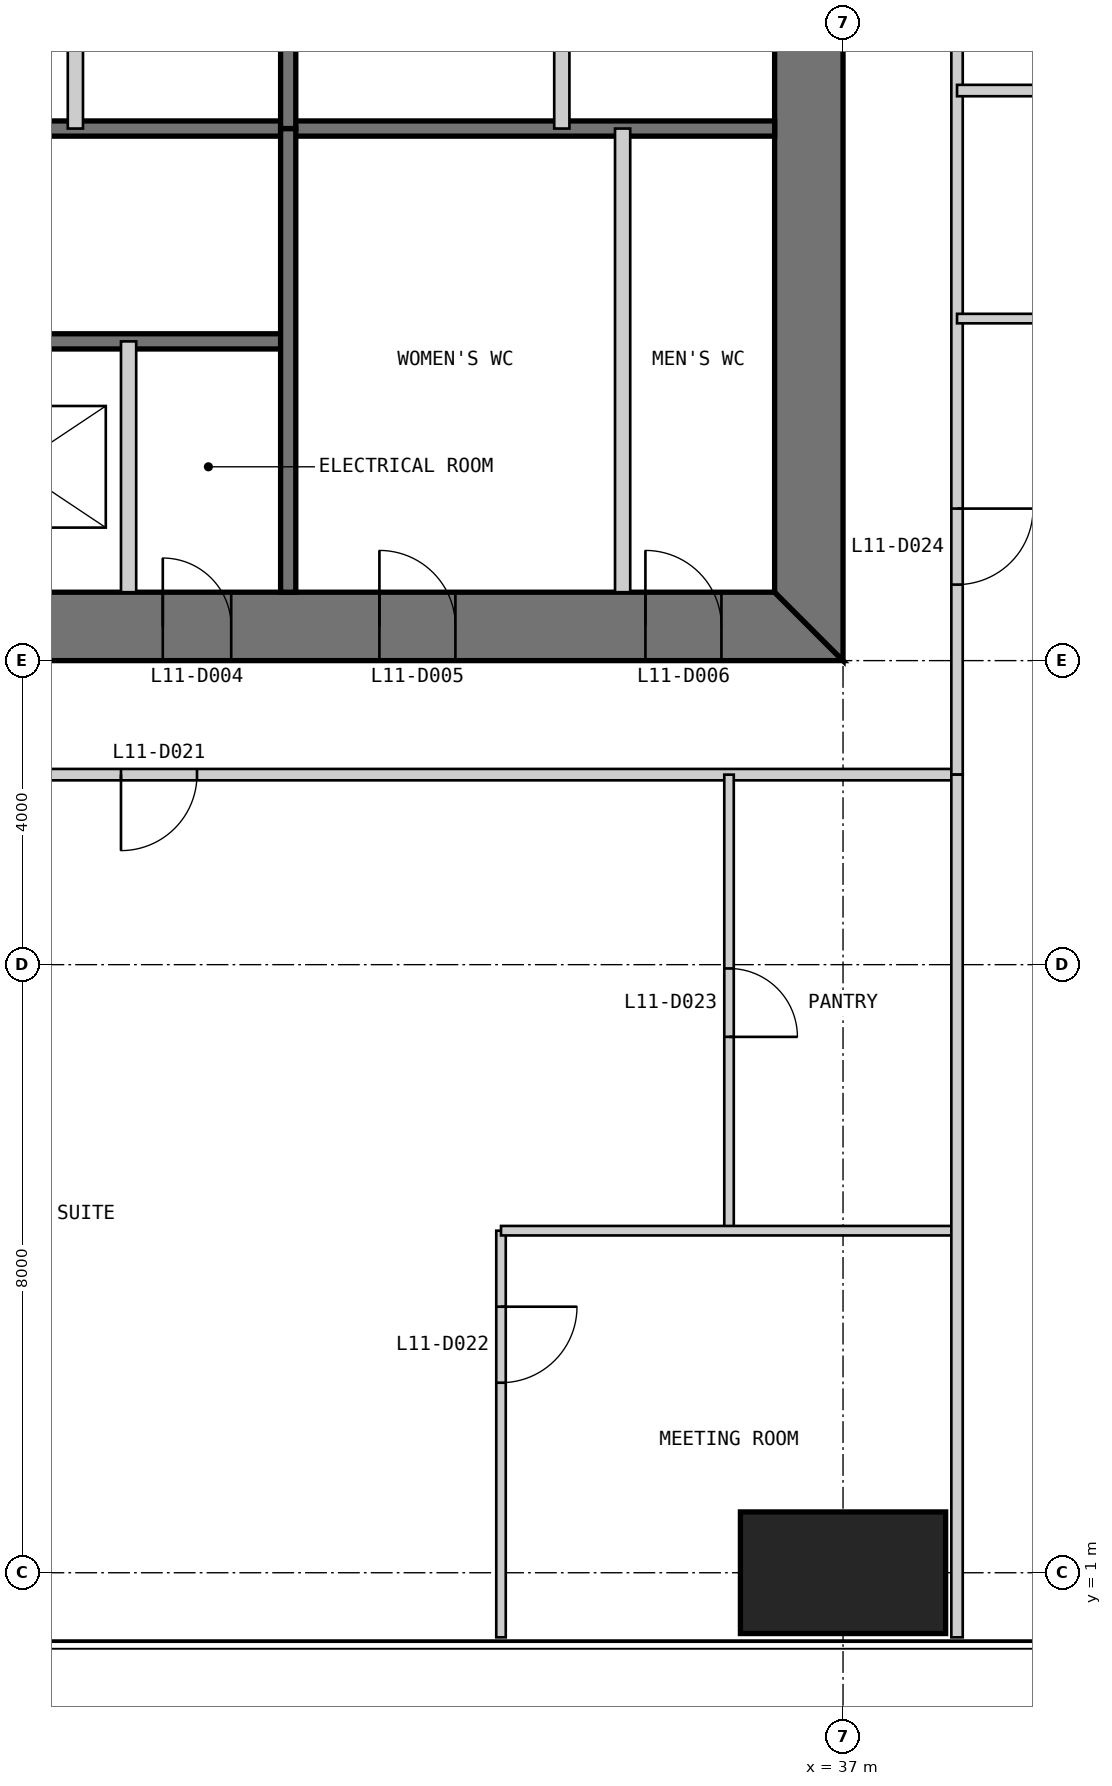
"""IFC4 building model, lengths in metres.
Left out: names, types, materials, properties, quantities, classifications, styles, units other than length and angle.
Written with IfcOpenShell. Run it as: python <this file> out.ifc"""

import sys

from ifc_helpers import new_model, si_unit, direction, frame, frame_2d, origin, origin_2d, place, context, subcontext, project, spatial, polyline, rectangle, outline, extrude, element, fill, save


model = new_model("IFC4")
c1 = context("Model", 3, precision=1e-05, world=origin(), true_north=direction((0.0, 1.0)))
c2 = subcontext(c1, "Body", "Model", "MODEL_VIEW")
j1 = project(units=[si_unit("LENGTHUNIT", "METRE"), si_unit("PLANEANGLEUNIT", "RADIAN")], contexts=[c1])
p1 = place(None, origin())
s1 = spatial("IfcSite", under=j1, at=p1, CompositionType="ELEMENT")
p2 = place(p1, origin())
s2 = spatial("IfcBuilding", under=s1, at=p2, CompositionType="ELEMENT")
p3 = place(p2, frame((0.0, 0.0, 51.0)))
s3 = spatial("IfcBuildingStorey", under=s2, at=p3, CompositionType="ELEMENT", Elevation=51.0)
p4 = place(p3, frame((37.0, 1.0, 0.0), z_axis=(0.0, 0.0, 1.0), x_axis=(1.0, 0.0, 0.0)))
e1 = element("IfcColumn", 1, at=p4, inside=s3, PredefinedType="COLUMN", context=c2, shape_type="SweptSolid", body=[
    extrude(rectangle(XDim=2.7, YDim=1.6, at=origin_2d()), origin(), (0.0, 0.0, 1.0), 4.0),
])
p5 = place(p3, frame((13.0, 13.45, 0.0), z_axis=(0.0, 0.0, 1.0), x_axis=(1.0, 0.0, 0.0)))
e2 = element("IfcWall", 2, at=p5, inside=s3, PredefinedType="SHEAR", context=c2, shape_type="SweptSolid", body=[
    extrude(outline(polyline([(0.0, -0.45), (24.0, -0.45), (23.1, 0.45), (0.9, 0.45), (0.0, -0.45)])), origin(), (0.0, 0.0, 1.0), 4.0),
])
p6 = place(p5, frame((4.9, 0.0, 0.0)))
e3 = element("IfcOpeningElement", 3, at=p6, cuts=e2, PredefinedType="OPENING", context=c2, shape_type="SweptSolid", body=[
    extrude(rectangle(XDim=1.0, YDim=2.2, at=frame_2d((0.5, 1.1))), frame((0.0, 0.46, 0.0), z_axis=(0.0, -1.0, 0.0), x_axis=(1.0, 0.0, 0.0)), (0.0, 0.0, 1.0), 0.92),
])
p7 = place(p5, frame((8.9, 0.0, 0.0)))
e4 = element("IfcOpeningElement", 4, at=p7, cuts=e2, PredefinedType="OPENING", context=c2, shape_type="SweptSolid", body=[
    extrude(rectangle(XDim=1.1, YDim=2.2, at=frame_2d((0.55, 1.1))), frame((0.0, 0.46, 0.0), z_axis=(0.0, -1.0, 0.0), x_axis=(1.0, 0.0, 0.0)), (0.0, 0.0, 1.0), 0.92),
])
p8 = place(p5, frame((15.05, 0.0, 0.0)))
e5 = element("IfcOpeningElement", 5, at=p8, cuts=e2, PredefinedType="OPENING", context=c2, shape_type="SweptSolid", body=[
    extrude(rectangle(XDim=0.9, YDim=2.2, at=frame_2d((0.45, 1.1))), frame((0.0, 0.46, 0.0), z_axis=(0.0, -1.0, 0.0), x_axis=(1.0, 0.0, 0.0)), (0.0, 0.0, 1.0), 0.92),
])
p9 = place(p5, frame((17.9, 0.0, 0.0)))
e6 = element("IfcOpeningElement", 6, at=p9, cuts=e2, PredefinedType="OPENING", context=c2, shape_type="SweptSolid", body=[
    extrude(rectangle(XDim=1.0, YDim=2.2, at=frame_2d((0.5, 1.1))), frame((0.0, 0.46, 0.0), z_axis=(0.0, -1.0, 0.0), x_axis=(1.0, 0.0, 0.0)), (0.0, 0.0, 1.0), 0.92),
])
p10 = place(p5, frame((21.4, 0.0, 0.0)))
e7 = element("IfcOpeningElement", 7, at=p10, cuts=e2, PredefinedType="OPENING", context=c2, shape_type="SweptSolid", body=[
    extrude(rectangle(XDim=1.0, YDim=2.2, at=frame_2d((0.5, 1.1))), frame((0.0, 0.46, 0.0), z_axis=(0.0, -1.0, 0.0), x_axis=(1.0, 0.0, 0.0)), (0.0, 0.0, 1.0), 0.92),
])
p11 = place(p3, frame((36.55, 13.9, 0.0), z_axis=(0.0, 0.0, 1.0), x_axis=(0.0, 1.0, 0.0)))
e8 = element("IfcWall", 8, at=p11, inside=s3, PredefinedType="SHEAR", context=c2, shape_type="SweptSolid", body=[
    extrude(outline(polyline([(-0.9, -0.45), (23.1, -0.45), (22.2, 0.45), (0.0, 0.45), (-0.9, -0.45)])), origin(), (0.0, 0.0, 1.0), 4.0),
])
p12 = place(p11, frame((20.2, 0.0, 0.0)))
e9 = element("IfcOpeningElement", 9, at=p12, cuts=e8, PredefinedType="OPENING", context=c2, shape_type="SweptSolid", body=[
    extrude(rectangle(XDim=1.0, YDim=2.2, at=frame_2d((0.5, 1.1))), frame((0.0, 0.46, 0.0), z_axis=(0.0, -1.0, 0.0), x_axis=(1.0, 0.0, 0.0)), (0.0, 0.0, 1.0), 0.92),
])
p13 = place(p11, frame((17.25, 0.0, 0.0)))
e10 = element("IfcOpeningElement", 10, at=p13, cuts=e8, PredefinedType="OPENING", context=c2, shape_type="SweptSolid", body=[
    extrude(rectangle(XDim=0.9, YDim=2.2, at=frame_2d((0.45, 1.1))), frame((0.0, 0.46, 0.0), z_axis=(0.0, -1.0, 0.0), x_axis=(1.0, 0.0, 0.0)), (0.0, 0.0, 1.0), 0.92),
])
p14 = place(p3, frame((20.3, 17.2, 0.0), z_axis=(0.0, 0.0, 1.0), x_axis=(1.0, 0.0, 0.0)))
e11 = element("IfcWall", 11, at=p14, inside=s3, PredefinedType="SOLIDWALL", context=c2, shape_type="SweptSolid", body=[
    extrude(rectangle(XDim=9.4, YDim=0.2, at=frame_2d((4.7, 0.0))), origin(), (0.0, 0.0, 1.0), 3.8),
])
p15 = place(p14, frame((0.25, 0.0, 0.0)))
e12 = element("IfcOpeningElement", 12, at=p15, cuts=e11, PredefinedType="OPENING", context=c2, shape_type="SweptSolid", body=[
    extrude(rectangle(XDim=1.0, YDim=2.2, at=frame_2d((0.5, 1.1))), frame((0.0, 0.11, 0.0), z_axis=(0.0, -1.0, 0.0), x_axis=(1.0, 0.0, 0.0)), (0.0, 0.0, 1.0), 0.22),
])
p16 = place(p3, frame((20.3, 20.0, 0.0), z_axis=(0.0, 0.0, 1.0), x_axis=(1.0, 0.0, 0.0)))
e13 = element("IfcWall", 13, at=p16, inside=s3, PredefinedType="SOLIDWALL", context=c2, shape_type="SweptSolid", body=[
    extrude(rectangle(XDim=15.8, YDim=0.2, at=frame_2d((7.9, 0.0))), origin(), (0.0, 0.0, 1.0), 3.8),
])
p17 = place(p3, frame((27.6, 13.9, 0.0), z_axis=(0.0, 0.0, 1.0), x_axis=(0.0, 1.0, 0.0)))
e14 = element("IfcWall", 14, at=p17, inside=s3, PredefinedType="PARTITIONING", context=c2, shape_type="SweptSolid", body=[
    extrude(rectangle(XDim=3.3, YDim=0.2, at=frame_2d((1.65, 0.0))), origin(), (0.0, 0.0, 1.0), 3.8),
])
p18 = place(p3, frame((29.7, 13.9, 0.0), z_axis=(0.0, 0.0, 1.0), x_axis=(0.0, 1.0, 0.0)))
e15 = element("IfcWall", 15, at=p18, inside=s3, PredefinedType="SOLIDWALL", context=c2, shape_type="SweptSolid", body=[
    extrude(rectangle(XDim=6.1, YDim=0.2, at=frame_2d((3.05, 0.0))), origin(), (0.0, 0.0, 1.0), 3.8),
])
p19 = place(p3, frame((34.1, 13.9, 0.0), z_axis=(0.0, 0.0, 1.0), x_axis=(0.0, 1.0, 0.0)))
e16 = element("IfcWall", 16, at=p19, inside=s3, PredefinedType="PARTITIONING", context=c2, shape_type="SweptSolid", body=[
    extrude(rectangle(XDim=6.1, YDim=0.2, at=frame_2d((3.05, 0.0))), origin(), (0.0, 0.0, 1.0), 3.8),
])
p20 = place(p3, frame((33.3, 36.1, 0.0), z_axis=(0.0, 0.0, 1.0), x_axis=(0.0, -1.0, 0.0)))
e17 = element("IfcWall", 17, at=p20, inside=s3, PredefinedType="PARTITIONING", context=c2, shape_type="SweptSolid", body=[
    extrude(rectangle(XDim=16.1, YDim=0.2, at=frame_2d((8.05, 0.0))), origin(), (0.0, 0.0, 1.0), 3.8),
])
p21 = place(p20, frame((4.1, 0.0, 0.0)))
e18 = element("IfcOpeningElement", 18, at=p21, cuts=e17, PredefinedType="OPENING", context=c2, shape_type="SweptSolid", body=[
    extrude(rectangle(XDim=0.9, YDim=2.2, at=frame_2d((0.45, 1.1))), frame((0.0, 0.11, 0.0), z_axis=(0.0, -1.0, 0.0), x_axis=(1.0, 0.0, 0.0)), (0.0, 0.0, 1.0), 0.22),
])
p22 = place(p3, frame((29.7, 36.1, 0.0), z_axis=(0.0, 0.0, 1.0), x_axis=(0.0, -1.0, 0.0)))
e19 = element("IfcWall", 19, at=p22, inside=s3, PredefinedType="SOLIDWALL", context=c2, shape_type="SweptSolid", body=[
    extrude(rectangle(XDim=16.1, YDim=0.2, at=frame_2d((8.05, 0.0))), origin(), (0.0, 0.0, 1.0), 3.8),
])
p23 = place(p3, frame((26.9, 30.0, 0.0), z_axis=(0.0, 0.0, 1.0), x_axis=(0.0, -1.0, 0.0)))
e20 = element("IfcWall", 20, at=p23, inside=s3, PredefinedType="PARTITIONING", context=c2, shape_type="SweptSolid", body=[
    extrude(rectangle(XDim=10.0, YDim=0.2, at=frame_2d((5.0, 0.0))), origin(), (0.0, 0.0, 1.0), 3.8),
])
p24 = place(p3, frame((11.5, 11.5, 0.0), z_axis=(0.0, 0.0, 1.0), x_axis=(1.0, 0.0, 0.0)))
e21 = element("IfcWall", 21, at=p24, inside=s3, PredefinedType="PARTITIONING", context=c2, shape_type="SweptSolid", body=[
    extrude(rectangle(XDim=27.0, YDim=0.15, at=frame_2d((13.5, 0.0))), origin(), (0.0, 0.0, 1.0), 3.85),
])
p25 = place(p24, frame((2.5, 0.0, 0.0)))
e22 = element("IfcOpeningElement", 22, at=p25, cuts=e21, PredefinedType="OPENING", context=c2, shape_type="SweptSolid", body=[
    extrude(rectangle(XDim=1.0, YDim=2.2, at=frame_2d((0.5, 1.1))), frame((0.0, 0.085, 0.0), z_axis=(0.0, -1.0, 0.0), x_axis=(1.0, 0.0, 0.0)), (0.0, 0.0, 1.0), 0.17),
])
p26 = place(p24, frame((16.0, 0.0, 0.0)))
e23 = element("IfcOpeningElement", 23, at=p26, cuts=e21, PredefinedType="OPENING", context=c2, shape_type="SweptSolid", body=[
    extrude(rectangle(XDim=1.0, YDim=2.2, at=frame_2d((0.5, 1.1))), frame((0.0, 0.085, 0.0), z_axis=(0.0, -1.0, 0.0), x_axis=(1.0, 0.0, 0.0)), (0.0, 0.0, 1.0), 0.17),
])
p27 = place(p3, frame((32.5, 0.15, 0.0), z_axis=(0.0, 0.0, 1.0), x_axis=(0.0, 1.0, 0.0)))
e24 = element("IfcWall", 24, at=p27, inside=s3, PredefinedType="PARTITIONING", context=c2, shape_type="SweptSolid", body=[
    extrude(rectangle(XDim=5.35, YDim=0.125, at=frame_2d((2.675, 0.0))), origin(), (0.0, 0.0, 1.0), 3.85),
])
p28 = place(p27, frame((3.35, 0.0, 0.0)))
e25 = element("IfcOpeningElement", 25, at=p28, cuts=e24, PredefinedType="OPENING", context=c2, shape_type="SweptSolid", body=[
    extrude(rectangle(XDim=1.0, YDim=2.2, at=frame_2d((0.5, 1.1))), frame((0.0, 0.073, 0.0), z_axis=(0.0, -1.0, 0.0), x_axis=(1.0, 0.0, 0.0)), (0.0, 0.0, 1.0), 0.145),
])
p29 = place(p3, frame((35.5, 5.5, 0.0), z_axis=(0.0, 0.0, 1.0), x_axis=(0.0, 1.0, 0.0)))
e26 = element("IfcWall", 26, at=p29, inside=s3, PredefinedType="PARTITIONING", context=c2, shape_type="SweptSolid", body=[
    extrude(rectangle(XDim=6.0, YDim=0.125, at=frame_2d((3.0, 0.0))), origin(), (0.0, 0.0, 1.0), 3.85),
])
p30 = place(p29, frame((2.55, 0.0, 0.0)))
e27 = element("IfcOpeningElement", 27, at=p30, cuts=e26, PredefinedType="OPENING", context=c2, shape_type="SweptSolid", body=[
    extrude(rectangle(XDim=0.9, YDim=2.2, at=frame_2d((0.45, 1.1))), frame((0.0, 0.073, 0.0), z_axis=(0.0, -1.0, 0.0), x_axis=(1.0, 0.0, 0.0)), (0.0, 0.0, 1.0), 0.145),
])
p31 = place(p3, frame((32.5, 5.5, 0.0), z_axis=(0.0, 0.0, 1.0), x_axis=(1.0, 0.0, 0.0)))
e28 = element("IfcWall", 28, at=p31, inside=s3, PredefinedType="PARTITIONING", context=c2, shape_type="SweptSolid", body=[
    extrude(rectangle(XDim=6.0, YDim=0.125, at=frame_2d((3.0, 0.0))), origin(), (0.0, 0.0, 1.0), 3.85),
])
p32 = place(p3, frame((38.5, 11.5, 0.0), z_axis=(0.0, 0.0, 1.0), x_axis=(0.0, 1.0, 0.0)))
e29 = element("IfcWall", 29, at=p32, inside=s3, PredefinedType="PARTITIONING", context=c2, shape_type="SweptSolid", body=[
    extrude(rectangle(XDim=27.0, YDim=0.15, at=frame_2d((13.5, 0.0))), origin(), (0.0, 0.0, 1.0), 3.85),
])
p33 = place(p32, frame((2.5, 0.0, 0.0)))
e30 = element("IfcOpeningElement", 30, at=p33, cuts=e29, PredefinedType="OPENING", context=c2, shape_type="SweptSolid", body=[
    extrude(rectangle(XDim=1.0, YDim=2.2, at=frame_2d((0.5, 1.1))), frame((0.0, 0.085, 0.0), z_axis=(0.0, -1.0, 0.0), x_axis=(1.0, 0.0, 0.0)), (0.0, 0.0, 1.0), 0.17),
])
p34 = place(p32, frame((16.0, 0.0, 0.0)))
e31 = element("IfcOpeningElement", 31, at=p34, cuts=e29, PredefinedType="OPENING", context=c2, shape_type="SweptSolid", body=[
    extrude(rectangle(XDim=1.0, YDim=2.2, at=frame_2d((0.5, 1.1))), frame((0.0, 0.085, 0.0), z_axis=(0.0, -1.0, 0.0), x_axis=(1.0, 0.0, 0.0)), (0.0, 0.0, 1.0), 0.17),
])
p35 = place(p3, frame((38.5, 0.15, 0.0), z_axis=(0.0, 0.0, 1.0), x_axis=(0.0, 1.0, 0.0)))
e32 = element("IfcWall", 32, at=p35, inside=s3, PredefinedType="PARTITIONING", context=c2, shape_type="SweptSolid", body=[
    extrude(rectangle(XDim=11.35, YDim=0.15, at=frame_2d((5.675, 0.0))), origin(), (0.0, 0.0, 1.0), 3.85),
])
p36 = place(p3, frame((44.5, 17.5, 0.0), z_axis=(0.0, 0.0, 1.0), x_axis=(-1.0, 0.0, 0.0)))
e33 = element("IfcWall", 33, at=p36, inside=s3, PredefinedType="PARTITIONING", context=c2, shape_type="SweptSolid", body=[
    extrude(rectangle(XDim=6.0, YDim=0.125, at=frame_2d((3.0, 0.0))), origin(), (0.0, 0.0, 1.0), 3.85),
])
p37 = place(p36, frame((2.55, 0.0, 0.0)))
e34 = element("IfcOpeningElement", 34, at=p37, cuts=e33, PredefinedType="OPENING", context=c2, shape_type="SweptSolid", body=[
    extrude(rectangle(XDim=0.9, YDim=2.2, at=frame_2d((0.45, 1.1))), frame((0.0, 0.073, 0.0), z_axis=(0.0, -1.0, 0.0), x_axis=(1.0, 0.0, 0.0)), (0.0, 0.0, 1.0), 0.145),
])
p38 = place(p3, frame((49.85, 20.5, 0.0), z_axis=(0.0, 0.0, 1.0), x_axis=(-1.0, 0.0, 0.0)))
e35 = element("IfcWall", 35, at=p38, inside=s3, PredefinedType="PARTITIONING", context=c2, shape_type="SweptSolid", body=[
    extrude(rectangle(XDim=11.35, YDim=0.15, at=frame_2d((5.675, 0.0))), origin(), (0.0, 0.0, 1.0), 3.85),
])
p39 = place(p8, origin())
e36 = element("IfcDoor", 36, at=p39, inside=s3, OperationType="SINGLE_SWING_LEFT", PredefinedType="DOOR", context=c2, shape_type="SweptSolid", body=[
    extrude(rectangle(XDim=0.9, YDim=2.2, at=frame_2d((0.45, 1.1))), frame((0.0, 0.025, 0.0), z_axis=(0.0, -1.0, 0.0), x_axis=(1.0, 0.0, 0.0)), (0.0, 0.0, 1.0), 0.05),
    extrude(outline(polyline([(0.0, 0.0), (0.04, 0.0), (0.04, 2.16), (0.86, 2.16), (0.86, 0.0), (0.9, 0.0), (0.9, 2.2), (0.0, 2.2), (0.0, 0.0)])), frame((0.0, 0.3, 0.0), z_axis=(0.0, -1.0, 0.0), x_axis=(1.0, 0.0, 0.0)), (0.0, 0.0, 1.0), 0.6),
])
fill(e5, e36)
p40 = place(p9, origin())
e37 = element("IfcDoor", 37, at=p40, inside=s3, OperationType="SINGLE_SWING_LEFT", PredefinedType="DOOR", context=c2, shape_type="SweptSolid", body=[
    extrude(rectangle(XDim=1.0, YDim=2.2, at=frame_2d((0.5, 1.1))), frame((0.0, 0.025, 0.0), z_axis=(0.0, -1.0, 0.0), x_axis=(1.0, 0.0, 0.0)), (0.0, 0.0, 1.0), 0.05),
    extrude(outline(polyline([(0.0, 0.0), (0.04, 0.0), (0.04, 2.16), (0.96, 2.16), (0.96, 0.0), (1.0, 0.0), (1.0, 2.2), (0.0, 2.2), (0.0, 0.0)])), frame((0.0, 0.3, 0.0), z_axis=(0.0, -1.0, 0.0), x_axis=(1.0, 0.0, 0.0)), (0.0, 0.0, 1.0), 0.6),
])
fill(e6, e37)
p41 = place(p10, origin())
e38 = element("IfcDoor", 38, at=p41, inside=s3, OperationType="SINGLE_SWING_LEFT", PredefinedType="DOOR", context=c2, shape_type="SweptSolid", body=[
    extrude(rectangle(XDim=1.0, YDim=2.2, at=frame_2d((0.5, 1.1))), frame((0.0, 0.025, 0.0), z_axis=(0.0, -1.0, 0.0), x_axis=(1.0, 0.0, 0.0)), (0.0, 0.0, 1.0), 0.05),
    extrude(outline(polyline([(0.0, 0.0), (0.04, 0.0), (0.04, 2.16), (0.96, 2.16), (0.96, 0.0), (1.0, 0.0), (1.0, 2.2), (0.0, 2.2), (0.0, 0.0)])), frame((0.0, 0.3, 0.0), z_axis=(0.0, -1.0, 0.0), x_axis=(1.0, 0.0, 0.0)), (0.0, 0.0, 1.0), 0.6),
])
fill(e7, e38)
p42 = place(p26, frame((1.0, 0.0, 0.0), z_axis=(0.0, 0.0, 1.0), x_axis=(-1.0, 0.0, 0.0)))
e39 = element("IfcDoor", 39, at=p42, inside=s3, OperationType="SINGLE_SWING_RIGHT", PredefinedType="DOOR", context=c2, shape_type="SweptSolid", body=[
    extrude(rectangle(XDim=1.0, YDim=2.2, at=frame_2d((0.5, 1.1))), frame((0.0, 0.025, 0.0), z_axis=(0.0, -1.0, 0.0), x_axis=(1.0, 0.0, 0.0)), (0.0, 0.0, 1.0), 0.05),
])
fill(e23, e39)
p43 = place(p28, frame((1.0, 0.0, 0.0), z_axis=(0.0, 0.0, 1.0), x_axis=(-1.0, 0.0, 0.0)))
e40 = element("IfcDoor", 40, at=p43, inside=s3, OperationType="SINGLE_SWING_LEFT", PredefinedType="DOOR", context=c2, shape_type="SweptSolid", body=[
    extrude(rectangle(XDim=1.0, YDim=2.2, at=frame_2d((0.5, 1.1))), frame((0.0, 0.025, 0.0), z_axis=(0.0, -1.0, 0.0), x_axis=(1.0, 0.0, 0.0)), (0.0, 0.0, 1.0), 0.05),
])
fill(e25, e40)
p44 = place(p30, frame((0.9, 0.0, 0.0), z_axis=(0.0, 0.0, 1.0), x_axis=(-1.0, 0.0, 0.0)))
e41 = element("IfcDoor", 41, at=p44, inside=s3, OperationType="SINGLE_SWING_RIGHT", PredefinedType="DOOR", context=c2, shape_type="SweptSolid", body=[
    extrude(rectangle(XDim=0.9, YDim=2.2, at=frame_2d((0.45, 1.1))), frame((0.0, 0.025, 0.0), z_axis=(0.0, -1.0, 0.0), x_axis=(1.0, 0.0, 0.0)), (0.0, 0.0, 1.0), 0.05),
])
fill(e27, e41)
p45 = place(p33, frame((1.0, 0.0, 0.0), z_axis=(0.0, 0.0, 1.0), x_axis=(-1.0, 0.0, 0.0)))
e42 = element("IfcDoor", 42, at=p45, inside=s3, OperationType="SINGLE_SWING_LEFT", PredefinedType="DOOR", context=c2, shape_type="SweptSolid", body=[
    extrude(rectangle(XDim=1.0, YDim=2.2, at=frame_2d((0.5, 1.1))), frame((0.0, 0.025, 0.0), z_axis=(0.0, -1.0, 0.0), x_axis=(1.0, 0.0, 0.0)), (0.0, 0.0, 1.0), 0.05),
])
fill(e30, e42)
save(model, sys.argv[1])
